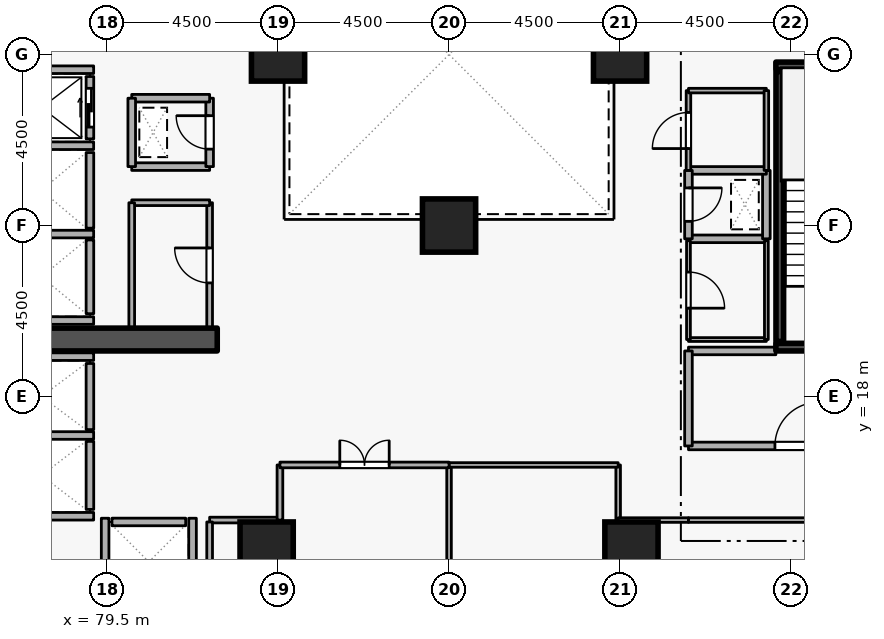
"""IFC4 building model, lengths in metres.
Left out: names, types, materials, properties, quantities, classifications, styles, units other than length and angle.
Written with IfcOpenShell. Run it as: python <this file> out.ifc"""

import sys

from ifc_helpers import new_model, si_unit, direction, frame, frame_2d, origin, origin_2d, place, context, subcontext, project, spatial, rectangle, extrude, element, fill, save


model = new_model("IFC4")
c1 = context("Model", 3, precision=1e-05, world=origin(), true_north=direction((0.0, 1.0)))
c2 = subcontext(c1, "Body", "Model", "MODEL_VIEW")
j1 = project(units=[si_unit("LENGTHUNIT", "METRE"), si_unit("PLANEANGLEUNIT", "RADIAN")], contexts=[c1])
p1 = place(None, origin())
s1 = spatial("IfcSite", under=j1, at=p1, CompositionType="ELEMENT")
p2 = place(p1, origin())
s2 = spatial("IfcBuilding", under=s1, at=p2, CompositionType="ELEMENT")
p3 = place(p2, frame((0.0, 0.0, 57.3)))
s3 = spatial("IfcBuildingStorey", under=s2, at=p3, CompositionType="ELEMENT", Elevation=57.3)
p4 = place(p3, frame((76.7, 19.5, 0.0), z_axis=(0.0, 0.0, 1.0), x_axis=(1.0, 0.0, 0.0)))
e1 = element("IfcWall", 1, at=p4, inside=s3, PredefinedType="SHEAR", context=c2, shape_type="SweptSolid", body=[
    extrude(rectangle(XDim=5.7, YDim=0.6, at=frame_2d((2.85, 0.0))), origin(), (0.0, 0.0, 1.0), 3.6),
])
for number, where, z_axis, x_axis in (
    (2, (93.3, 14.0, 0.0), (0.0, 0.0, 1.0), (1.0, 0.0, 0.0)),
    (3, (83.7, 14.0, 0.0), (0.0, 0.0, 1.0), (1.0, 0.0, 0.0)),
    (4, (93.0, 27.0, 0.0), (0.0, 0.0, 1.0), (1.0, 0.0, 0.0)),
    (5, (84.0, 27.0, 0.0), (0.0, 0.0, 1.0), (1.0, 0.0, 0.0)),
    (6, (88.5, 22.5, 0.0), (0.0, 0.0, 1.0), (1.0, 0.0, 0.0)),
):
    element("IfcColumn", number, at=place(p3, frame(where, z_axis=z_axis, x_axis=x_axis)), inside=s3, PredefinedType="COLUMN", context=c2, shape_type="SweptSolid", body=[
        extrude(rectangle(XDim=1.4, YDim=1.4, at=origin_2d()), origin(), (0.0, 0.0, 1.0), 3.6),
    ])
p5 = place(p3, frame((79.05, 24.78, 0.0), z_axis=(0.0, 0.0, 1.0), x_axis=(0.0, 1.0, 0.0)))
e7 = element("IfcWall", 7, at=p5, inside=s3, PredefinedType="STANDARD", context=c2, shape_type="SweptSolid", body=[
    extrude(rectangle(XDim=1.64, YDim=0.2, at=frame_2d((0.82, 0.0))), origin(), (0.0, 0.0, 1.0), 3.34),
])
p6 = place(p5, frame((0.31, 0.0, 0.0)))
e8 = element("IfcOpeningElement", 8, at=p6, cuts=e7, PredefinedType="OPENING", context=c2, shape_type="SweptSolid", body=[
    extrude(rectangle(XDim=1.02, YDim=2.06, at=frame_2d((0.51, 1.03))), frame((0.0, 0.11, 0.0), z_axis=(0.0, -1.0, 0.0), x_axis=(1.0, 0.0, 0.0)), (0.0, 0.0, 1.0), 0.22),
])
p7 = place(p3, frame((79.05, 22.43, 0.0), z_axis=(0.0, 0.0, 1.0), x_axis=(0.0, 1.0, 0.0)))
e9 = element("IfcWall", 9, at=p7, inside=s3, PredefinedType="STANDARD", context=c2, shape_type="SweptSolid", body=[
    extrude(rectangle(XDim=1.99, YDim=0.2, at=frame_2d((0.995, 0.0))), origin(), (0.0, 0.0, 1.0), 3.34),
])
p8 = place(p3, frame((79.05, 20.18, 0.0), z_axis=(0.0, 0.0, 1.0), x_axis=(0.0, 1.0, 0.0)))
e10 = element("IfcWall", 10, at=p8, inside=s3, PredefinedType="STANDARD", context=c2, shape_type="SweptSolid", body=[
    extrude(rectangle(XDim=1.94, YDim=0.2, at=frame_2d((0.97, 0.0))), origin(), (0.0, 0.0, 1.0), 3.34),
])
p9 = place(p3, frame((79.05, 17.13, 0.0), z_axis=(0.0, 0.0, 1.0), x_axis=(0.0, 1.0, 0.0)))
e11 = element("IfcWall", 11, at=p9, inside=s3, PredefinedType="STANDARD", context=c2, shape_type="SweptSolid", body=[
    extrude(rectangle(XDim=1.74, YDim=0.2, at=frame_2d((0.87, 0.0))), origin(), (0.0, 0.0, 1.0), 3.34),
])
p10 = place(p3, frame((79.05, 15.03, 0.0), z_axis=(0.0, 0.0, 1.0), x_axis=(0.0, 1.0, 0.0)))
e12 = element("IfcWall", 12, at=p10, inside=s3, PredefinedType="STANDARD", context=c2, shape_type="SweptSolid", body=[
    extrude(rectangle(XDim=1.79, YDim=0.2, at=frame_2d((0.895, 0.0))), origin(), (0.0, 0.0, 1.0), 3.34),
])
p11 = place(p3, frame((79.63, 14.7, 0.0), z_axis=(0.0, 0.0, 1.0), x_axis=(1.0, 0.0, 0.0)))
e13 = element("IfcWall", 13, at=p11, inside=s3, PredefinedType="STANDARD", context=c2, shape_type="SweptSolid", body=[
    extrude(rectangle(XDim=1.94, YDim=0.2, at=frame_2d((0.97, 0.0))), origin(), (0.0, 0.0, 1.0), 3.34),
])
for number, where, z_axis, x_axis in (
    (14, (76.712, 26.6, 0.0), (0.0, 0.0, 1.0), (1.0, 0.0, 0.0)),
    (15, (76.712, 24.6, 0.0), (0.0, 0.0, 1.0), (1.0, 0.0, 0.0)),
    (16, (76.712, 22.275, 0.0), (0.0, 0.0, 1.0), (1.0, 0.0, 0.0)),
    (17, (76.712, 20.0, 0.0), (0.0, 0.0, 1.0), (1.0, 0.0, 0.0)),
):
    element("IfcWall", number, at=place(p3, frame(where, z_axis=z_axis, x_axis=x_axis)), inside=s3, PredefinedType="STANDARD", context=c2, shape_type="SweptSolid", body=[
        extrude(rectangle(XDim=2.436, YDim=0.2, at=frame_2d((1.218, 0.0))), origin(), (0.0, 0.0, 1.0), 3.34),
    ])
p12 = place(p3, frame((76.402, 19.05, 0.0), z_axis=(0.0, 0.0, 1.0), x_axis=(1.0, 0.0, 0.0)))
e18 = element("IfcWall", 18, at=p12, inside=s3, PredefinedType="STANDARD", context=c2, shape_type="SweptSolid", body=[
    extrude(rectangle(XDim=2.746, YDim=0.2, at=frame_2d((1.373, 0.0))), origin(), (0.0, 0.0, 1.0), 2.545),
])
p13 = place(p3, frame((76.402, 16.975, 0.0), z_axis=(0.0, 0.0, 1.0), x_axis=(1.0, 0.0, 0.0)))
e19 = element("IfcWall", 19, at=p13, inside=s3, PredefinedType="STANDARD", context=c2, shape_type="SweptSolid", body=[
    extrude(rectangle(XDim=2.746, YDim=0.2, at=frame_2d((1.373, 0.0))), origin(), (0.0, 0.0, 1.0), 3.34),
])
p14 = place(p3, frame((76.512, 14.85, 0.0), z_axis=(0.0, 0.0, 1.0), x_axis=(1.0, 0.0, 0.0)))
e20 = element("IfcWall", 20, at=p14, inside=s3, PredefinedType="STANDARD", context=c2, shape_type="SweptSolid", body=[
    extrude(rectangle(XDim=2.636, YDim=0.2, at=frame_2d((1.318, 0.0))), origin(), (0.0, 0.0, 1.0), 3.34),
])
for number, where, z_axis, x_axis in (
    (21, (81.75, 12.612, 0.0), (0.0, 0.0, 1.0), (0.0, 1.0, 0.0)),
    (22, (79.45, 12.612, 0.0), (0.0, 0.0, 1.0), (0.0, 1.0, 0.0)),
):
    element("IfcWall", number, at=place(p3, frame(where, z_axis=z_axis, x_axis=x_axis)), inside=s3, PredefinedType="STANDARD", context=c2, shape_type="SweptSolid", body=[
        extrude(rectangle(XDim=2.186, YDim=0.2, at=frame_2d((1.093, 0.0))), origin(), (0.0, 0.0, 1.0), 3.34),
    ])
p15 = place(p3, frame((100.45, 19.3, 0.0), z_axis=(0.0, 0.0, 1.0), x_axis=(-1.0, 0.0, 0.0)))
e23 = element("IfcWall", 23, at=p15, inside=s3, PredefinedType="SHEAR", context=c2, shape_type="SweptSolid", body=[
    extrude(rectangle(XDim=3.35, YDim=0.2, at=frame_2d((1.675, 0.0))), origin(), (0.0, 0.0, 1.0), 3.6),
])
p16 = place(p15, frame((1.125, 0.0, 0.0)))
e24 = element("IfcOpeningElement", 24, at=p16, cuts=e23, PredefinedType="OPENING", context=c2, shape_type="SweptSolid", body=[
    extrude(rectangle(XDim=1.1, YDim=2.1, at=frame_2d((0.55, 1.05))), frame((0.0, 0.11, 0.0), z_axis=(0.0, -1.0, 0.0), x_axis=(1.0, 0.0, 0.0)), (0.0, 0.0, 1.0), 0.22),
])
p17 = place(p3, frame((97.1, 26.7, 0.0), z_axis=(0.0, 0.0, 1.0), x_axis=(1.0, 0.0, 0.0)))
e25 = element("IfcWall", 25, at=p17, inside=s3, PredefinedType="SHEAR", context=c2, shape_type="SweptSolid", body=[
    extrude(rectangle(XDim=3.35, YDim=0.2, at=frame_2d((1.675, 0.0))), origin(), (0.0, 0.0, 1.0), 3.6),
])
p18 = place(p3, frame((97.203, 26.55, 0.0), z_axis=(0.0, 0.0, 1.0), x_axis=(0.0, -1.0, 0.0)))
e26 = element("IfcWall", 26, at=p18, inside=s3, PredefinedType="SHEAR", context=c2, shape_type="SweptSolid", body=[
    extrude(rectangle(XDim=7.1, YDim=0.2, at=frame_2d((3.55, 0.0))), origin(), (0.0, 0.0, 1.0), 3.6),
])
p19 = place(p3, frame((94.8, 16.7, 0.0), z_axis=(0.0, 0.0, 1.0), x_axis=(1.0, 0.0, 0.0)))
e27 = element("IfcWall", 27, at=p19, inside=s3, PredefinedType="STANDARD", context=c2, shape_type="SweptSolid", body=[
    extrude(rectangle(XDim=5.7, YDim=0.2, at=frame_2d((2.85, 0.0))), origin(), (0.0, 0.0, 1.0), 3.34),
])
p20 = place(p19, frame((2.275, 0.0, 0.0)))
e28 = element("IfcOpeningElement", 28, at=p20, cuts=e27, PredefinedType="OPENING", context=c2, shape_type="SweptSolid", body=[
    extrude(rectangle(XDim=1.15, YDim=2.1, at=frame_2d((0.575, 1.05))), frame((0.0, 0.11, 0.0), z_axis=(0.0, -1.0, 0.0), x_axis=(1.0, 0.0, 0.0)), (0.0, 0.0, 1.0), 0.22),
])
p21 = place(p3, frame((97.1, 19.2, 0.0), z_axis=(0.0, 0.0, 1.0), x_axis=(-1.0, 0.0, 0.0)))
e29 = element("IfcWall", 29, at=p21, inside=s3, PredefinedType="STANDARD", context=c2, shape_type="SweptSolid", body=[
    extrude(rectangle(XDim=2.3, YDim=0.2, at=frame_2d((1.15, 0.0))), origin(), (0.0, 0.0, 1.0), 2.545),
])
p22 = place(p3, frame((94.8, 19.2, 0.0), z_axis=(0.0, 0.0, 1.0), x_axis=(0.0, -1.0, 0.0)))
e30 = element("IfcWall", 30, at=p22, inside=s3, PredefinedType="STANDARD", context=c2, shape_type="SweptSolid", body=[
    extrude(rectangle(XDim=2.5, YDim=0.2, at=frame_2d((1.25, 0.0))), origin(), (0.0, 0.0, 1.0), 3.34),
])
p23 = place(p3, frame((94.8, 22.15, 0.0), z_axis=(0.0, 0.0, 1.0), x_axis=(1.0, 0.0, 0.0)))
e31 = element("IfcWall", 31, at=p23, inside=s3, PredefinedType="STANDARD", context=c2, shape_type="SweptSolid", body=[
    extrude(rectangle(XDim=2.05, YDim=0.2, at=frame_2d((1.025, 0.0))), origin(), (0.0, 0.0, 1.0), 3.34),
])
p24 = place(p3, frame((96.85, 22.15, 0.0), z_axis=(0.0, 0.0, 1.0), x_axis=(0.0, 1.0, 0.0)))
e32 = element("IfcWall", 32, at=p24, inside=s3, PredefinedType="STANDARD", context=c2, shape_type="SweptSolid", body=[
    extrude(rectangle(XDim=1.8, YDim=0.2, at=frame_2d((0.9, 0.0))), origin(), (0.0, 0.0, 1.0), 3.34),
])
p25 = place(p3, frame((96.85, 23.95, 0.0), z_axis=(0.0, 0.0, 1.0), x_axis=(-1.0, 0.0, 0.0)))
e33 = element("IfcWall", 33, at=p25, inside=s3, PredefinedType="STANDARD", context=c2, shape_type="SweptSolid", body=[
    extrude(rectangle(XDim=2.05, YDim=0.2, at=frame_2d((1.025, 0.0))), origin(), (0.0, 0.0, 1.0), 3.34),
])
p26 = place(p3, frame((94.8, 23.95, 0.0), z_axis=(0.0, 0.0, 1.0), x_axis=(0.0, -1.0, 0.0)))
e34 = element("IfcWall", 34, at=p26, inside=s3, PredefinedType="STANDARD", context=c2, shape_type="SweptSolid", body=[
    extrude(rectangle(XDim=1.8, YDim=0.2, at=frame_2d((0.9, 0.0))), origin(), (0.0, 0.0, 1.0), 3.34),
])
p27 = place(p26, frame((0.46, 0.0, 0.0)))
e35 = element("IfcOpeningElement", 35, at=p27, cuts=e34, PredefinedType="OPENING", context=c2, shape_type="SweptSolid", body=[
    extrude(rectangle(XDim=0.88, YDim=2.04, at=frame_2d((0.44, 1.02))), frame((0.0, 0.11, 0.0), z_axis=(0.0, -1.0, 0.0), x_axis=(1.0, 0.0, 0.0)), (0.0, 0.0, 1.0), 0.22),
])
p28 = place(p3, frame((80.15, 24.05, 0.0), z_axis=(0.0, 0.0, 1.0), x_axis=(1.0, 0.0, 0.0)))
e36 = element("IfcWall", 36, at=p28, inside=s3, PredefinedType="STANDARD", context=c2, shape_type="SweptSolid", body=[
    extrude(rectangle(XDim=2.05, YDim=0.2, at=frame_2d((1.025, 0.0))), origin(), (0.0, 0.0, 1.0), 3.34),
])
p29 = place(p3, frame((82.2, 24.05, 0.0), z_axis=(0.0, 0.0, 1.0), x_axis=(0.0, 1.0, 0.0)))
e37 = element("IfcWall", 37, at=p29, inside=s3, PredefinedType="STANDARD", context=c2, shape_type="SweptSolid", body=[
    extrude(rectangle(XDim=1.8, YDim=0.2, at=frame_2d((0.9, 0.0))), origin(), (0.0, 0.0, 1.0), 3.34),
])
p30 = place(p29, frame((0.46, 0.0, 0.0)))
e38 = element("IfcOpeningElement", 38, at=p30, cuts=e37, PredefinedType="OPENING", context=c2, shape_type="SweptSolid", body=[
    extrude(rectangle(XDim=0.88, YDim=2.04, at=frame_2d((0.44, 1.02))), frame((0.0, 0.11, 0.0), z_axis=(0.0, -1.0, 0.0), x_axis=(1.0, 0.0, 0.0)), (0.0, 0.0, 1.0), 0.22),
])
p31 = place(p3, frame((82.2, 25.85, 0.0), z_axis=(0.0, 0.0, 1.0), x_axis=(-1.0, 0.0, 0.0)))
e39 = element("IfcWall", 39, at=p31, inside=s3, PredefinedType="STANDARD", context=c2, shape_type="SweptSolid", body=[
    extrude(rectangle(XDim=2.05, YDim=0.2, at=frame_2d((1.025, 0.0))), origin(), (0.0, 0.0, 1.0), 3.34),
])
p32 = place(p3, frame((80.15, 25.85, 0.0), z_axis=(0.0, 0.0, 1.0), x_axis=(0.0, -1.0, 0.0)))
e40 = element("IfcWall", 40, at=p32, inside=s3, PredefinedType="STANDARD", context=c2, shape_type="SweptSolid", body=[
    extrude(rectangle(XDim=1.8, YDim=0.2, at=frame_2d((0.9, 0.0))), origin(), (0.0, 0.0, 1.0), 3.34),
])
p33 = place(p3, frame((94.8, 19.5, 0.0), z_axis=(0.0, 0.0, 1.0), x_axis=(1.0, 0.0, 0.0)))
e41 = element("IfcWall", 41, at=p33, inside=s3, PredefinedType="PARTITIONING", context=c2, shape_type="SweptSolid", body=[
    extrude(rectangle(XDim=2.05, YDim=0.1, at=frame_2d((1.025, 0.0))), origin(), (0.0, 0.0, 1.0), 2.545),
])
p34 = place(p3, frame((96.85, 19.5, 0.0), z_axis=(0.0, 0.0, 1.0), x_axis=(0.0, 1.0, 0.0)))
e42 = element("IfcWall", 42, at=p34, inside=s3, PredefinedType="PARTITIONING", context=c2, shape_type="SweptSolid", body=[
    extrude(rectangle(XDim=2.6, YDim=0.1, at=frame_2d((1.3, 0.0))), origin(), (0.0, 0.0, 1.0), 3.34),
])
p35 = place(p3, frame((94.8, 22.1, 0.0), z_axis=(0.0, 0.0, 1.0), x_axis=(0.0, -1.0, 0.0)))
e43 = element("IfcWall", 43, at=p35, inside=s3, PredefinedType="PARTITIONING", context=c2, shape_type="SweptSolid", body=[
    extrude(rectangle(XDim=2.6, YDim=0.1, at=frame_2d((1.3, 0.0))), origin(), (0.0, 0.0, 1.0), 3.34),
])
p36 = place(p35, frame((0.825, 0.0, 0.0)))
e44 = element("IfcOpeningElement", 44, at=p36, cuts=e43, PredefinedType="OPENING", context=c2, shape_type="SweptSolid", body=[
    extrude(rectangle(XDim=0.95, YDim=2.1, at=frame_2d((0.475, 1.05))), frame((0.0, 0.06, 0.0), z_axis=(0.0, -1.0, 0.0), x_axis=(1.0, 0.0, 0.0)), (0.0, 0.0, 1.0), 0.12),
])
p37 = place(p3, frame((94.8, 23.95, 0.0), z_axis=(0.0, 0.0, 1.0), x_axis=(0.0, 1.0, 0.0)))
e45 = element("IfcWall", 45, at=p37, inside=s3, PredefinedType="PARTITIONING", context=c2, shape_type="SweptSolid", body=[
    extrude(rectangle(XDim=2.1, YDim=0.12, at=frame_2d((1.05, 0.0))), origin(), (0.0, 0.0, 1.0), 3.34),
])
p38 = place(p37, frame((0.575, 0.0, 0.0)))
e46 = element("IfcOpeningElement", 46, at=p38, cuts=e45, PredefinedType="OPENING", context=c2, shape_type="SweptSolid", body=[
    extrude(rectangle(XDim=0.95, YDim=2.1, at=frame_2d((0.475, 1.05))), frame((0.0, 0.07, 0.0), z_axis=(0.0, -1.0, 0.0), x_axis=(1.0, 0.0, 0.0)), (0.0, 0.0, 1.0), 0.14),
])
p39 = place(p3, frame((94.8, 26.05, 0.0), z_axis=(0.0, 0.0, 1.0), x_axis=(1.0, 0.0, 0.0)))
e47 = element("IfcWall", 47, at=p39, inside=s3, PredefinedType="PARTITIONING", context=c2, shape_type="SweptSolid", body=[
    extrude(rectangle(XDim=2.05, YDim=0.12, at=frame_2d((1.025, 0.0))), origin(), (0.0, 0.0, 1.0), 3.34),
])
p40 = place(p3, frame((96.85, 26.05, 0.0), z_axis=(0.0, 0.0, 1.0), x_axis=(0.0, -1.0, 0.0)))
e48 = element("IfcWall", 48, at=p40, inside=s3, PredefinedType="PARTITIONING", context=c2, shape_type="SweptSolid", body=[
    extrude(rectangle(XDim=2.1, YDim=0.12, at=frame_2d((1.05, 0.0))), origin(), (0.0, 0.0, 1.0), 3.34),
])
p41 = place(p3, frame((82.2, 19.8, 0.0), z_axis=(0.0, 0.0, 1.0), x_axis=(0.0, 1.0, 0.0)))
e49 = element("IfcWall", 49, at=p41, inside=s3, PredefinedType="PARTITIONING", context=c2, shape_type="SweptSolid", body=[
    extrude(rectangle(XDim=3.3, YDim=0.15, at=frame_2d((1.65, 0.0))), origin(), (0.0, 0.0, 1.0), 3.34),
])
p42 = place(p41, frame((1.19, 0.0, 0.0)))
e50 = element("IfcOpeningElement", 50, at=p42, cuts=e49, PredefinedType="OPENING", context=c2, shape_type="SweptSolid", body=[
    extrude(rectangle(XDim=0.92, YDim=2.08, at=frame_2d((0.46, 1.04))), frame((0.0, 0.085, 0.0), z_axis=(0.0, -1.0, 0.0), x_axis=(1.0, 0.0, 0.0)), (0.0, 0.0, 1.0), 0.17),
])
p43 = place(p3, frame((82.2, 23.1, 0.0), z_axis=(0.0, 0.0, 1.0), x_axis=(-1.0, 0.0, 0.0)))
e51 = element("IfcWall", 51, at=p43, inside=s3, PredefinedType="PARTITIONING", context=c2, shape_type="SweptSolid", body=[
    extrude(rectangle(XDim=2.05, YDim=0.15, at=frame_2d((1.025, 0.0))), origin(), (0.0, 0.0, 1.0), 3.34),
])
p44 = place(p3, frame((80.15, 23.1, 0.0), z_axis=(0.0, 0.0, 1.0), x_axis=(0.0, -1.0, 0.0)))
e52 = element("IfcWall", 52, at=p44, inside=s3, PredefinedType="PARTITIONING", context=c2, shape_type="SweptSolid", body=[
    extrude(rectangle(XDim=3.3, YDim=0.15, at=frame_2d((1.65, 0.0))), origin(), (0.0, 0.0, 1.0), 3.34),
])
p45 = place(p3, frame((92.95, 16.2, 0.0), z_axis=(0.0, 0.0, 1.0), x_axis=(0.0, -1.0, 0.0)))
e53 = element("IfcWall", 53, at=p45, inside=s3, PredefinedType="PARTITIONING", context=c2, shape_type="SweptSolid", body=[
    extrude(rectangle(XDim=1.45, YDim=0.12, at=frame_2d((0.725, 0.0))), origin(), (0.0, 0.0, 1.0), 3.34),
])
p46 = place(p3, frame((92.95, 14.75, 0.0), z_axis=(0.0, 0.0, 1.0), x_axis=(1.0, 0.0, 0.0)))
e54 = element("IfcWall", 54, at=p46, inside=s3, PredefinedType="PARTITIONING", context=c2, shape_type="SweptSolid", body=[
    extrude(rectangle(XDim=1.85, YDim=0.12, at=frame_2d((0.925, 0.0))), origin(), (0.0, 0.0, 1.0), 3.34),
])
p47 = place(p3, frame((94.8, 14.75, 0.0), z_axis=(0.0, 0.0, 1.0), x_axis=(1.0, 0.0, 0.0)))
e55 = element("IfcWall", 55, at=p47, inside=s3, PredefinedType="PARTITIONING", context=c2, shape_type="SweptSolid", body=[
    extrude(rectangle(XDim=9.35, YDim=0.12, at=frame_2d((4.675, 0.0))), origin(), (0.0, 0.0, 1.0), 3.34),
])
p48 = place(p47, frame((4.15, 0.0, 0.0)))
e56 = element("IfcOpeningElement", 56, at=p48, cuts=e55, PredefinedType="OPENING", context=c2, shape_type="SweptSolid", body=[
    extrude(rectangle(XDim=1.05, YDim=2.1, at=frame_2d((0.525, 1.05))), frame((0.0, 0.07, 0.0), z_axis=(0.0, -1.0, 0.0), x_axis=(1.0, 0.0, 0.0)), (0.0, 0.0, 1.0), 0.14),
])
p49 = place(p3, frame((88.5, 8.78, 0.0), z_axis=(0.0, 0.0, 1.0), x_axis=(0.0, 1.0, 0.0)))
e57 = element("IfcWall", 57, at=p49, inside=s3, PredefinedType="PARTITIONING", context=c2, shape_type="SweptSolid", body=[
    extrude(rectangle(XDim=7.42, YDim=0.12, at=frame_2d((3.71, 0.0))), origin(), (0.0, 0.0, 1.0), 2.932),
])
p50 = place(p3, frame((88.5, 16.2, 0.0), z_axis=(0.0, 0.0, 1.0), x_axis=(1.0, 0.0, 0.0)))
e58 = element("IfcWall", 58, at=p50, inside=s3, PredefinedType="PARTITIONING", context=c2, shape_type="SweptSolid", body=[
    extrude(rectangle(XDim=4.45, YDim=0.12, at=frame_2d((2.225, 0.0))), origin(), (0.0, 0.0, 1.0), 3.34),
])
p51 = place(p3, frame((82.2, 14.75, 0.0), z_axis=(0.0, 0.0, 1.0), x_axis=(1.0, 0.0, 0.0)))
e59 = element("IfcWall", 59, at=p51, inside=s3, PredefinedType="PARTITIONING", context=c2, shape_type="SweptSolid", body=[
    extrude(rectangle(XDim=1.85, YDim=0.15, at=frame_2d((0.925, 0.0))), origin(), (0.0, 0.0, 1.0), 3.34),
])
p52 = place(p3, frame((84.05, 14.75, 0.0), z_axis=(0.0, 0.0, 1.0), x_axis=(0.0, 1.0, 0.0)))
e60 = element("IfcWall", 60, at=p52, inside=s3, PredefinedType="PARTITIONING", context=c2, shape_type="SweptSolid", body=[
    extrude(rectangle(XDim=1.45, YDim=0.15, at=frame_2d((0.725, 0.0))), origin(), (0.0, 0.0, 1.0), 3.34),
])
p53 = place(p3, frame((84.05, 16.2, 0.0), z_axis=(0.0, 0.0, 1.0), x_axis=(1.0, 0.0, 0.0)))
e61 = element("IfcWall", 61, at=p53, inside=s3, PredefinedType="PARTITIONING", context=c2, shape_type="SweptSolid", body=[
    extrude(rectangle(XDim=4.45, YDim=0.15, at=frame_2d((2.225, 0.0))), origin(), (0.0, 0.0, 1.0), 3.34),
])
p54 = place(p53, frame((1.575, 0.0, 0.0)))
e62 = element("IfcOpeningElement", 62, at=p54, cuts=e61, PredefinedType="OPENING", context=c2, shape_type="SweptSolid", body=[
    extrude(rectangle(XDim=1.3, YDim=2.12, at=frame_2d((0.65, 1.06))), frame((0.0, 0.085, 0.0), z_axis=(0.0, -1.0, 0.0), x_axis=(1.0, 0.0, 0.0)), (0.0, 0.0, 1.0), 0.17),
])
p55 = place(p3, frame((82.2, 12.4, 0.0), z_axis=(0.0, 0.0, 1.0), x_axis=(0.0, 1.0, 0.0)))
e63 = element("IfcWall", 63, at=p55, inside=s3, PredefinedType="PARTITIONING", context=c2, shape_type="SweptSolid", body=[
    extrude(rectangle(XDim=2.3, YDim=0.15, at=frame_2d((1.15, 0.0))), origin(), (0.0, 0.0, 1.0), 3.34),
])
p56 = place(p6, origin())
e64 = element("IfcDoor", 64, at=p56, inside=s3, OperationType="SLIDING_TO_LEFT", PredefinedType="DOOR", context=c2, shape_type="SweptSolid", body=[
    extrude(rectangle(XDim=1.02, YDim=2.06, at=frame_2d((0.51, 1.03))), frame((0.0, 0.025, 0.0), z_axis=(0.0, -1.0, 0.0), x_axis=(1.0, 0.0, 0.0)), (0.0, 0.0, 1.0), 0.05),
])
fill(e8, e64)
p57 = place(p20, origin())
e65 = element("IfcDoor", 65, at=p57, inside=s3, OperationType="SINGLE_SWING_RIGHT", PredefinedType="DOOR", context=c2, shape_type="SweptSolid", body=[
    extrude(rectangle(XDim=1.15, YDim=2.1, at=frame_2d((0.575, 1.05))), frame((0.0, 0.025, 0.0), z_axis=(0.0, -1.0, 0.0), x_axis=(1.0, 0.0, 0.0)), (0.0, 0.0, 1.0), 0.05),
])
fill(e28, e65)
p58 = place(p27, origin())
e66 = element("IfcDoor", 66, at=p58, inside=s3, OperationType="SINGLE_SWING_LEFT", PredefinedType="DOOR", context=c2, shape_type="SweptSolid", body=[
    extrude(rectangle(XDim=0.88, YDim=2.04, at=frame_2d((0.44, 1.02))), frame((0.0, 0.025, 0.0), z_axis=(0.0, -1.0, 0.0), x_axis=(1.0, 0.0, 0.0)), (0.0, 0.0, 1.0), 0.05),
])
fill(e35, e66)
p59 = place(p30, origin())
e67 = element("IfcDoor", 67, at=p59, inside=s3, OperationType="SINGLE_SWING_RIGHT", PredefinedType="DOOR", context=c2, shape_type="SweptSolid", body=[
    extrude(rectangle(XDim=0.88, YDim=2.04, at=frame_2d((0.44, 1.02))), frame((0.0, 0.025, 0.0), z_axis=(0.0, -1.0, 0.0), x_axis=(1.0, 0.0, 0.0)), (0.0, 0.0, 1.0), 0.05),
])
fill(e38, e67)
p60 = place(p36, origin())
e68 = element("IfcDoor", 68, at=p60, inside=s3, OperationType="SINGLE_SWING_RIGHT", PredefinedType="DOOR", context=c2, shape_type="SweptSolid", body=[
    extrude(rectangle(XDim=0.95, YDim=2.1, at=frame_2d((0.475, 1.05))), frame((0.0, 0.025, 0.0), z_axis=(0.0, -1.0, 0.0), x_axis=(1.0, 0.0, 0.0)), (0.0, 0.0, 1.0), 0.05),
])
fill(e44, e68)
p61 = place(p38, origin())
e69 = element("IfcDoor", 69, at=p61, inside=s3, OperationType="SINGLE_SWING_LEFT", PredefinedType="DOOR", context=c2, shape_type="SweptSolid", body=[
    extrude(rectangle(XDim=0.95, YDim=2.1, at=frame_2d((0.475, 1.05))), frame((0.0, 0.025, 0.0), z_axis=(0.0, -1.0, 0.0), x_axis=(1.0, 0.0, 0.0)), (0.0, 0.0, 1.0), 0.05),
])
fill(e46, e69)
p62 = place(p42, origin())
e70 = element("IfcDoor", 70, at=p62, inside=s3, OperationType="SINGLE_SWING_RIGHT", PredefinedType="DOOR", context=c2, shape_type="SweptSolid", body=[
    extrude(rectangle(XDim=0.92, YDim=2.08, at=frame_2d((0.46, 1.04))), frame((0.0, 0.025, 0.0), z_axis=(0.0, -1.0, 0.0), x_axis=(1.0, 0.0, 0.0)), (0.0, 0.0, 1.0), 0.05),
])
fill(e50, e70)
p63 = place(p54, origin())
e71 = element("IfcDoor", 71, at=p63, inside=s3, OperationType="DOUBLE_DOOR_SINGLE_SWING", PredefinedType="DOOR", context=c2, shape_type="SweptSolid", body=[
    extrude(rectangle(XDim=1.3, YDim=2.12, at=frame_2d((0.65, 1.06))), frame((0.0, 0.025, 0.0), z_axis=(0.0, -1.0, 0.0), x_axis=(1.0, 0.0, 0.0)), (0.0, 0.0, 1.0), 0.05),
])
fill(e62, e71)
save(model, sys.argv[1])
